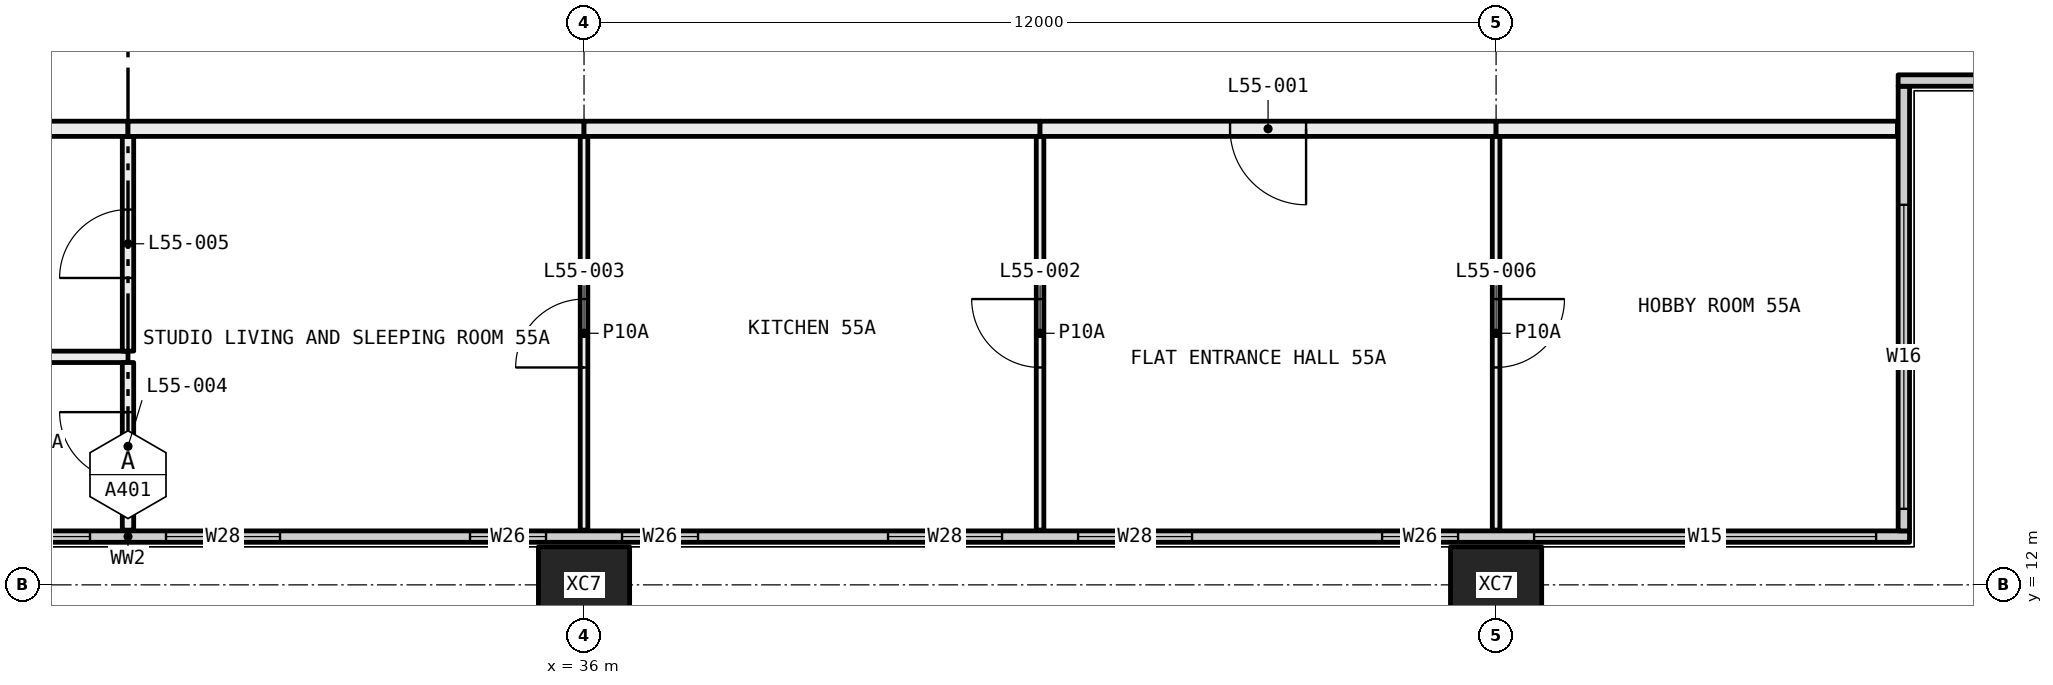
"""IFC4 building model, lengths in metres.
Left out: names, types, materials, properties, quantities, classifications, styles, units other than length and angle.
Written with IfcOpenShell. Run it as: python <this file> out.ifc"""

import sys

from ifc_helpers import new_model, si_unit, direction, frame, frame_2d, origin, origin_2d, place, context, subcontext, project, spatial, rectangle, hollow_rectangle, extrude, element, fill, save


model = new_model("IFC4")
c1 = context("Model", 3, precision=1e-05, world=origin(), true_north=direction((0.0, 1.0)))
c2 = subcontext(c1, "Body", "Model", "MODEL_VIEW")
j1 = project(units=[si_unit("LENGTHUNIT", "METRE"), si_unit("PLANEANGLEUNIT", "RADIAN")], contexts=[c1])
p1 = place(None, origin())
s1 = spatial("IfcSite", under=j1, at=p1, CompositionType="ELEMENT")
p2 = place(p1, origin())
s2 = spatial("IfcBuilding", under=s1, at=p2, CompositionType="ELEMENT")
p3 = place(p2, frame((0.0, 0.0, 206.55)))
s3 = spatial("IfcBuildingStorey", under=s2, at=p3, CompositionType="ELEMENT", Elevation=206.55)
for number, where, z_axis, x_axis in (
    (1, (36.0, 12.0, -0.4), (0.0, 0.0, 1.0), (1.0, 0.0, 0.0)),
    (2, (48.0, 12.0, -0.4), (0.0, 0.0, 1.0), (1.0, 0.0, 0.0)),
):
    element("IfcColumn", number, at=place(p3, frame(where, z_axis=z_axis, x_axis=x_axis)), inside=s3, PredefinedType="COLUMN", context=c2, shape_type="SweptSolid", body=[
        extrude(hollow_rectangle(XDim=1.2, YDim=1.0, WallThickness=0.045, at=origin_2d()), origin(), (0.0, 0.0, 1.0), 3.45),
    ])
p4 = place(p3, frame((6.56, 12.635, 0.0), z_axis=(0.0, 0.0, 1.0), x_axis=(1.0, 0.0, 0.0)))
e3 = element("IfcWall", 3, at=p4, inside=s3, PredefinedType="ELEMENTEDWALL", context=c2, shape_type="SweptSolid", body=[
    extrude(rectangle(XDim=46.88, YDim=0.15, at=frame_2d((23.44, 0.0))), origin(), (0.0, 0.0, 1.0), 3.05),
])
p5 = place(p4, frame((0.44, 0.0, 0.45)))
e4 = element("IfcOpeningElement", 4, at=p5, cuts=e3, PredefinedType="OPENING", context=c2, shape_type="SweptSolid", body=[
    extrude(rectangle(XDim=4.5, YDim=2.55, at=frame_2d((2.25, 1.275))), frame((0.0, 0.085, 0.0), z_axis=(0.0, -1.0, 0.0), x_axis=(1.0, 0.0, 0.0)), (0.0, 0.0, 1.0), 0.17),
])
p6 = place(p4, frame((5.94, 0.0, 0.45)))
e5 = element("IfcOpeningElement", 5, at=p6, cuts=e3, PredefinedType="OPENING", context=c2, shape_type="SweptSolid", body=[
    extrude(rectangle(XDim=1.0, YDim=2.55, at=frame_2d((0.5, 1.275))), frame((0.0, 0.085, 0.0), z_axis=(0.0, -1.0, 0.0), x_axis=(1.0, 0.0, 0.0)), (0.0, 0.0, 1.0), 0.17),
])
p7 = place(p4, frame((9.44, 0.0, 0.45)))
e6 = element("IfcOpeningElement", 6, at=p7, cuts=e3, PredefinedType="OPENING", context=c2, shape_type="SweptSolid", body=[
    extrude(rectangle(XDim=1.5, YDim=2.55, at=frame_2d((0.75, 1.275))), frame((0.0, 0.085, 0.0), z_axis=(0.0, -1.0, 0.0), x_axis=(1.0, 0.0, 0.0)), (0.0, 0.0, 1.0), 0.17),
])
p8 = place(p4, frame((11.94, 0.0, 0.45)))
e7 = element("IfcOpeningElement", 7, at=p8, cuts=e3, PredefinedType="OPENING", context=c2, shape_type="SweptSolid", body=[
    extrude(rectangle(XDim=1.5, YDim=2.55, at=frame_2d((0.75, 1.275))), frame((0.0, 0.085, 0.0), z_axis=(0.0, -1.0, 0.0), x_axis=(1.0, 0.0, 0.0)), (0.0, 0.0, 1.0), 0.17),
])
p9 = place(p4, frame((15.94, 0.0, 0.45)))
e8 = element("IfcOpeningElement", 8, at=p9, cuts=e3, PredefinedType="OPENING", context=c2, shape_type="SweptSolid", body=[
    extrude(rectangle(XDim=1.0, YDim=2.55, at=frame_2d((0.5, 1.275))), frame((0.0, 0.085, 0.0), z_axis=(0.0, -1.0, 0.0), x_axis=(1.0, 0.0, 0.0)), (0.0, 0.0, 1.0), 0.17),
])
p10 = place(p4, frame((17.94, 0.0, 0.45)))
e9 = element("IfcOpeningElement", 9, at=p10, cuts=e3, PredefinedType="OPENING", context=c2, shape_type="SweptSolid", body=[
    extrude(rectangle(XDim=1.0, YDim=2.55, at=frame_2d((0.5, 1.275))), frame((0.0, 0.085, 0.0), z_axis=(0.0, -1.0, 0.0), x_axis=(1.0, 0.0, 0.0)), (0.0, 0.0, 1.0), 0.17),
])
p11 = place(p4, frame((21.44, 0.0, 0.45)))
e10 = element("IfcOpeningElement", 10, at=p11, cuts=e3, PredefinedType="OPENING", context=c2, shape_type="SweptSolid", body=[
    extrude(rectangle(XDim=1.5, YDim=2.55, at=frame_2d((0.75, 1.275))), frame((0.0, 0.085, 0.0), z_axis=(0.0, -1.0, 0.0), x_axis=(1.0, 0.0, 0.0)), (0.0, 0.0, 1.0), 0.17),
])
p12 = place(p4, frame((23.94, 0.0, 0.45)))
e11 = element("IfcOpeningElement", 11, at=p12, cuts=e3, PredefinedType="OPENING", context=c2, shape_type="SweptSolid", body=[
    extrude(rectangle(XDim=1.5, YDim=2.55, at=frame_2d((0.75, 1.275))), frame((0.0, 0.085, 0.0), z_axis=(0.0, -1.0, 0.0), x_axis=(1.0, 0.0, 0.0)), (0.0, 0.0, 1.0), 0.17),
])
p13 = place(p4, frame((27.94, 0.0, 0.45)))
e12 = element("IfcOpeningElement", 12, at=p13, cuts=e3, PredefinedType="OPENING", context=c2, shape_type="SweptSolid", body=[
    extrude(rectangle(XDim=1.0, YDim=2.55, at=frame_2d((0.5, 1.275))), frame((0.0, 0.085, 0.0), z_axis=(0.0, -1.0, 0.0), x_axis=(1.0, 0.0, 0.0)), (0.0, 0.0, 1.0), 0.17),
])
p14 = place(p4, frame((29.94, 0.0, 0.45)))
e13 = element("IfcOpeningElement", 13, at=p14, cuts=e3, PredefinedType="OPENING", context=c2, shape_type="SweptSolid", body=[
    extrude(rectangle(XDim=1.0, YDim=2.55, at=frame_2d((0.5, 1.275))), frame((0.0, 0.085, 0.0), z_axis=(0.0, -1.0, 0.0), x_axis=(1.0, 0.0, 0.0)), (0.0, 0.0, 1.0), 0.17),
])
p15 = place(p4, frame((33.44, 0.0, 0.45)))
e14 = element("IfcOpeningElement", 14, at=p15, cuts=e3, PredefinedType="OPENING", context=c2, shape_type="SweptSolid", body=[
    extrude(rectangle(XDim=1.5, YDim=2.55, at=frame_2d((0.75, 1.275))), frame((0.0, 0.085, 0.0), z_axis=(0.0, -1.0, 0.0), x_axis=(1.0, 0.0, 0.0)), (0.0, 0.0, 1.0), 0.17),
])
p16 = place(p4, frame((35.94, 0.0, 0.45)))
e15 = element("IfcOpeningElement", 15, at=p16, cuts=e3, PredefinedType="OPENING", context=c2, shape_type="SweptSolid", body=[
    extrude(rectangle(XDim=1.5, YDim=2.55, at=frame_2d((0.75, 1.275))), frame((0.0, 0.085, 0.0), z_axis=(0.0, -1.0, 0.0), x_axis=(1.0, 0.0, 0.0)), (0.0, 0.0, 1.0), 0.17),
])
p17 = place(p4, frame((39.94, 0.0, 0.45)))
e16 = element("IfcOpeningElement", 16, at=p17, cuts=e3, PredefinedType="OPENING", context=c2, shape_type="SweptSolid", body=[
    extrude(rectangle(XDim=1.0, YDim=2.55, at=frame_2d((0.5, 1.275))), frame((0.0, 0.085, 0.0), z_axis=(0.0, -1.0, 0.0), x_axis=(1.0, 0.0, 0.0)), (0.0, 0.0, 1.0), 0.17),
])
p18 = place(p4, frame((41.94, 0.0, 0.45)))
e17 = element("IfcOpeningElement", 17, at=p18, cuts=e3, PredefinedType="OPENING", context=c2, shape_type="SweptSolid", body=[
    extrude(rectangle(XDim=4.5, YDim=2.55, at=frame_2d((2.25, 1.275))), frame((0.0, 0.085, 0.0), z_axis=(0.0, -1.0, 0.0), x_axis=(1.0, 0.0, 0.0)), (0.0, 0.0, 1.0), 0.17),
])
p19 = place(p3, frame((53.365, 12.71, 0.0), z_axis=(0.0, 0.0, 1.0), x_axis=(0.0, 1.0, 0.0)))
e18 = element("IfcWall", 18, at=p19, inside=s3, PredefinedType="ELEMENTEDWALL", context=c2, shape_type="SweptSolid", body=[
    extrude(rectangle(XDim=5.85, YDim=0.15, at=frame_2d((2.925, 0.0))), origin(), (0.0, 0.0, 1.0), 3.05),
])
p20 = place(p19, frame((0.29, 0.0, 0.45)))
e19 = element("IfcOpeningElement", 19, at=p20, cuts=e18, PredefinedType="OPENING", context=c2, shape_type="SweptSolid", body=[
    extrude(rectangle(XDim=4.0, YDim=2.55, at=frame_2d((2.0, 1.275))), frame((0.0, 0.085, 0.0), z_axis=(0.0, -1.0, 0.0), x_axis=(1.0, 0.0, 0.0)), (0.0, 0.0, 1.0), 0.17),
])
p21 = place(p3, frame((53.29, 18.635, 0.0), z_axis=(0.0, 0.0, 1.0), x_axis=(1.0, 0.0, 0.0)))
e20 = element("IfcWall", 20, at=p21, inside=s3, PredefinedType="ELEMENTEDWALL", context=c2, shape_type="SweptSolid", body=[
    extrude(rectangle(XDim=6.15, YDim=0.15, at=frame_2d((3.075, 0.0))), origin(), (0.0, 0.0, 1.0), 3.05),
])
p22 = place(p21, frame((1.71, 0.0, 0.45)))
e21 = element("IfcOpeningElement", 21, at=p22, cuts=e20, PredefinedType="OPENING", context=c2, shape_type="SweptSolid", body=[
    extrude(rectangle(XDim=4.0, YDim=2.55, at=frame_2d((2.0, 1.275))), frame((0.0, 0.085, 0.0), z_axis=(0.0, -1.0, 0.0), x_axis=(1.0, 0.0, 0.0)), (0.0, 0.0, 1.0), 0.17),
])
p23 = place(p3, frame((30.0, 15.0, 0.0), z_axis=(0.0, 0.0, 1.0), x_axis=(-1.0, 0.0, 0.0)))
e22 = element("IfcWall", 22, at=p23, inside=s3, PredefinedType="PARTITIONING", context=c2, shape_type="SweptSolid", body=[
    extrude(rectangle(XDim=5.9, YDim=0.15, at=frame_2d((2.95, 0.0))), origin(), (0.0, 0.0, 1.0), 3.05),
])
p24 = place(p3, frame((30.0, 12.72, 0.0), z_axis=(0.0, 0.0, 1.0), x_axis=(0.0, 1.0, 0.0)))
e23 = element("IfcWall", 23, at=p24, inside=s3, PredefinedType="PARTITIONING", context=c2, shape_type="SweptSolid", body=[
    extrude(rectangle(XDim=2.205, YDim=0.15, at=frame_2d((1.103, 0.0))), origin(), (0.0, 0.0, 1.0), 3.05),
])
p25 = place(p24, frame((0.653, 0.0, 0.0)))
e24 = element("IfcOpeningElement", 24, at=p25, cuts=e23, PredefinedType="OPENING", context=c2, shape_type="SweptSolid", body=[
    extrude(rectangle(XDim=0.9, YDim=2.1, at=frame_2d((0.45, 1.05))), frame((0.0, 0.085, 0.0), z_axis=(0.0, -1.0, 0.0), x_axis=(1.0, 0.0, 0.0)), (0.0, 0.0, 1.0), 0.17),
])
p26 = place(p3, frame((30.0, 15.075, 0.0), z_axis=(0.0, 0.0, 1.0), x_axis=(0.0, 1.0, 0.0)))
e25 = element("IfcWall", 25, at=p26, inside=s3, PredefinedType="PARTITIONING", context=c2, shape_type="SweptSolid", body=[
    extrude(rectangle(XDim=2.825, YDim=0.15, at=frame_2d((1.413, 0.0))), origin(), (0.0, 0.0, 1.0), 3.05),
])
p27 = place(p26, frame((0.962, 0.0, 0.0)))
e26 = element("IfcOpeningElement", 26, at=p27, cuts=e25, PredefinedType="OPENING", context=c2, shape_type="SweptSolid", body=[
    extrude(rectangle(XDim=0.9, YDim=2.1, at=frame_2d((0.45, 1.05))), frame((0.0, 0.085, 0.0), z_axis=(0.0, -1.0, 0.0), x_axis=(1.0, 0.0, 0.0)), (0.0, 0.0, 1.0), 0.17),
])
p28 = place(p3, frame((30.0, 18.0, 0.0), z_axis=(0.0, 0.0, 1.0), x_axis=(-1.0, 0.0, 0.0)))
e27 = element("IfcWall", 27, at=p28, inside=s3, PredefinedType="PARTITIONING", context=c2, shape_type="SweptSolid", body=[
    extrude(rectangle(XDim=5.9, YDim=0.2, at=frame_2d((2.95, 0.0))), origin(), (0.0, 0.0, 1.0), 3.05),
])
p29 = place(p3, frame((36.0, 12.72, 0.0), z_axis=(0.0, 0.0, 1.0), x_axis=(0.0, 1.0, 0.0)))
e28 = element("IfcWall", 28, at=p29, inside=s3, PredefinedType="PARTITIONING", context=c2, shape_type="SweptSolid", body=[
    extrude(rectangle(XDim=5.18, YDim=0.1, at=frame_2d((2.59, 0.0))), origin(), (0.0, 0.0, 1.0), 2.45),
])
p30 = place(p29, frame((2.14, 0.0, 0.0)))
e29 = element("IfcOpeningElement", 29, at=p30, cuts=e28, PredefinedType="OPENING", context=c2, shape_type="SweptSolid", body=[
    extrude(rectangle(XDim=0.9, YDim=2.1, at=frame_2d((0.45, 1.05))), frame((0.0, 0.06, 0.0), z_axis=(0.0, -1.0, 0.0), x_axis=(1.0, 0.0, 0.0)), (0.0, 0.0, 1.0), 0.12),
])
p31 = place(p3, frame((36.0, 18.0, 0.0), z_axis=(0.0, 0.0, 1.0), x_axis=(-1.0, 0.0, 0.0)))
e30 = element("IfcWall", 30, at=p31, inside=s3, PredefinedType="PARTITIONING", context=c2, shape_type="SweptSolid", body=[
    extrude(rectangle(XDim=6.0, YDim=0.2, at=frame_2d((3.0, 0.0))), origin(), (0.0, 0.0, 1.0), 2.45),
])
p32 = place(p3, frame((42.0, 12.72, 0.0), z_axis=(0.0, 0.0, 1.0), x_axis=(0.0, 1.0, 0.0)))
e31 = element("IfcWall", 31, at=p32, inside=s3, PredefinedType="PARTITIONING", context=c2, shape_type="SweptSolid", body=[
    extrude(rectangle(XDim=5.18, YDim=0.1, at=frame_2d((2.59, 0.0))), origin(), (0.0, 0.0, 1.0), 3.05),
])
p33 = place(p32, frame((2.14, 0.0, 0.0)))
e32 = element("IfcOpeningElement", 32, at=p33, cuts=e31, PredefinedType="OPENING", context=c2, shape_type="SweptSolid", body=[
    extrude(rectangle(XDim=0.9, YDim=2.1, at=frame_2d((0.45, 1.05))), frame((0.0, 0.06, 0.0), z_axis=(0.0, -1.0, 0.0), x_axis=(1.0, 0.0, 0.0)), (0.0, 0.0, 1.0), 0.12),
])
p34 = place(p3, frame((42.0, 18.0, 0.0), z_axis=(0.0, 0.0, 1.0), x_axis=(-1.0, 0.0, 0.0)))
e33 = element("IfcWall", 33, at=p34, inside=s3, PredefinedType="PARTITIONING", context=c2, shape_type="SweptSolid", body=[
    extrude(rectangle(XDim=6.0, YDim=0.2, at=frame_2d((3.0, 0.0))), origin(), (0.0, 0.0, 1.0), 2.45),
])
p35 = place(p3, frame((48.0, 12.72, 0.0), z_axis=(0.0, 0.0, 1.0), x_axis=(0.0, 1.0, 0.0)))
e34 = element("IfcWall", 34, at=p35, inside=s3, PredefinedType="PARTITIONING", context=c2, shape_type="SweptSolid", body=[
    extrude(rectangle(XDim=5.18, YDim=0.1, at=frame_2d((2.59, 0.0))), origin(), (0.0, 0.0, 1.0), 3.05),
])
p36 = place(p35, frame((2.14, 0.0, 0.0)))
e35 = element("IfcOpeningElement", 35, at=p36, cuts=e34, PredefinedType="OPENING", context=c2, shape_type="SweptSolid", body=[
    extrude(rectangle(XDim=0.9, YDim=2.1, at=frame_2d((0.45, 1.05))), frame((0.0, 0.06, 0.0), z_axis=(0.0, -1.0, 0.0), x_axis=(1.0, 0.0, 0.0)), (0.0, 0.0, 1.0), 0.12),
])
p37 = place(p3, frame((48.0, 18.0, 0.0), z_axis=(0.0, 0.0, 1.0), x_axis=(-1.0, 0.0, 0.0)))
e36 = element("IfcWall", 36, at=p37, inside=s3, PredefinedType="PARTITIONING", context=c2, shape_type="SweptSolid", body=[
    extrude(rectangle(XDim=6.0, YDim=0.2, at=frame_2d((3.0, 0.0))), origin(), (0.0, 0.0, 1.0), 3.05),
])
p38 = place(p37, frame((2.5, 0.0, 0.0)))
e37 = element("IfcOpeningElement", 37, at=p38, cuts=e36, PredefinedType="OPENING", context=c2, shape_type="SweptSolid", body=[
    extrude(rectangle(XDim=1.0, YDim=2.1, at=frame_2d((0.5, 1.05))), frame((0.0, 0.11, 0.0), z_axis=(0.0, -1.0, 0.0), x_axis=(1.0, 0.0, 0.0)), (0.0, 0.0, 1.0), 0.22),
])
p39 = place(p3, frame((53.28, 18.0, 0.0), z_axis=(0.0, 0.0, 1.0), x_axis=(-1.0, 0.0, 0.0)))
e38 = element("IfcWall", 38, at=p39, inside=s3, PredefinedType="PARTITIONING", context=c2, shape_type="SweptSolid", body=[
    extrude(rectangle(XDim=5.28, YDim=0.2, at=frame_2d((2.64, 0.0))), origin(), (0.0, 0.0, 1.0), 3.05),
])
p40 = place(p11, origin())
e39 = element("IfcWindow", 39, at=p40, inside=s3, PartitioningType="SINGLE_PANEL", PredefinedType="WINDOW", context=c2, shape_type="SweptSolid", body=[
    extrude(rectangle(XDim=1.5, YDim=2.55, at=frame_2d((0.75, 1.275))), frame((0.0, 0.03, 0.0), z_axis=(0.0, -1.0, 0.0), x_axis=(1.0, 0.0, 0.0)), (0.0, 0.0, 1.0), 0.06),
])
fill(e10, e39)
p41 = place(p12, origin())
e40 = element("IfcWindow", 40, at=p41, inside=s3, PartitioningType="SINGLE_PANEL", PredefinedType="WINDOW", context=c2, shape_type="SweptSolid", body=[
    extrude(rectangle(XDim=1.5, YDim=2.55, at=frame_2d((0.75, 1.275))), frame((0.0, 0.03, 0.0), z_axis=(0.0, -1.0, 0.0), x_axis=(1.0, 0.0, 0.0)), (0.0, 0.0, 1.0), 0.06),
])
fill(e11, e40)
p42 = place(p13, origin())
e41 = element("IfcWindow", 41, at=p42, inside=s3, PartitioningType="SINGLE_PANEL", PredefinedType="WINDOW", context=c2, shape_type="SweptSolid", body=[
    extrude(rectangle(XDim=1.0, YDim=2.55, at=frame_2d((0.5, 1.275))), frame((0.0, 0.03, 0.0), z_axis=(0.0, -1.0, 0.0), x_axis=(1.0, 0.0, 0.0)), (0.0, 0.0, 1.0), 0.06),
])
fill(e12, e41)
p43 = place(p14, origin())
e42 = element("IfcWindow", 42, at=p43, inside=s3, PartitioningType="SINGLE_PANEL", PredefinedType="WINDOW", context=c2, shape_type="SweptSolid", body=[
    extrude(rectangle(XDim=1.0, YDim=2.55, at=frame_2d((0.5, 1.275))), frame((0.0, 0.03, 0.0), z_axis=(0.0, -1.0, 0.0), x_axis=(1.0, 0.0, 0.0)), (0.0, 0.0, 1.0), 0.06),
])
fill(e13, e42)
p44 = place(p15, origin())
e43 = element("IfcWindow", 43, at=p44, inside=s3, PartitioningType="SINGLE_PANEL", PredefinedType="WINDOW", context=c2, shape_type="SweptSolid", body=[
    extrude(rectangle(XDim=1.5, YDim=2.55, at=frame_2d((0.75, 1.275))), frame((0.0, 0.03, 0.0), z_axis=(0.0, -1.0, 0.0), x_axis=(1.0, 0.0, 0.0)), (0.0, 0.0, 1.0), 0.06),
])
fill(e14, e43)
p45 = place(p16, origin())
e44 = element("IfcWindow", 44, at=p45, inside=s3, PartitioningType="SINGLE_PANEL", PredefinedType="WINDOW", context=c2, shape_type="SweptSolid", body=[
    extrude(rectangle(XDim=1.5, YDim=2.55, at=frame_2d((0.75, 1.275))), frame((0.0, 0.03, 0.0), z_axis=(0.0, -1.0, 0.0), x_axis=(1.0, 0.0, 0.0)), (0.0, 0.0, 1.0), 0.06),
])
fill(e15, e44)
p46 = place(p17, origin())
e45 = element("IfcWindow", 45, at=p46, inside=s3, PartitioningType="SINGLE_PANEL", PredefinedType="WINDOW", context=c2, shape_type="SweptSolid", body=[
    extrude(rectangle(XDim=1.0, YDim=2.55, at=frame_2d((0.5, 1.275))), frame((0.0, 0.03, 0.0), z_axis=(0.0, -1.0, 0.0), x_axis=(1.0, 0.0, 0.0)), (0.0, 0.0, 1.0), 0.06),
])
fill(e16, e45)
p47 = place(p18, origin())
e46 = element("IfcWindow", 46, at=p47, inside=s3, PartitioningType="SINGLE_PANEL", PredefinedType="WINDOW", context=c2, shape_type="SweptSolid", body=[
    extrude(rectangle(XDim=4.5, YDim=2.55, at=frame_2d((2.25, 1.275))), frame((0.0, 0.03, 0.0), z_axis=(0.0, -1.0, 0.0), x_axis=(1.0, 0.0, 0.0)), (0.0, 0.0, 1.0), 0.06),
])
fill(e17, e46)
p48 = place(p20, origin())
e47 = element("IfcWindow", 47, at=p48, inside=s3, PartitioningType="SINGLE_PANEL", PredefinedType="WINDOW", context=c2, shape_type="SweptSolid", body=[
    extrude(rectangle(XDim=4.0, YDim=2.55, at=frame_2d((2.0, 1.275))), frame((0.0, 0.03, 0.0), z_axis=(0.0, -1.0, 0.0), x_axis=(1.0, 0.0, 0.0)), (0.0, 0.0, 1.0), 0.06),
])
fill(e19, e47)
p49 = place(p38, origin())
e48 = element("IfcDoor", 48, at=p49, inside=s3, OperationType="SINGLE_SWING_RIGHT", PredefinedType="DOOR", context=c2, shape_type="SweptSolid", body=[
    extrude(rectangle(XDim=1.0, YDim=2.1, at=frame_2d((0.5, 1.05))), frame((0.0, 0.025, 0.0), z_axis=(0.0, -1.0, 0.0), x_axis=(1.0, 0.0, 0.0)), (0.0, 0.0, 1.0), 0.05),
])
fill(e37, e48)
p50 = place(p33, origin())
e49 = element("IfcDoor", 49, at=p50, inside=s3, OperationType="SINGLE_SWING_LEFT", PredefinedType="DOOR", context=c2, shape_type="SweptSolid", body=[
    extrude(rectangle(XDim=0.9, YDim=2.1, at=frame_2d((0.45, 1.05))), frame((0.0, 0.025, 0.0), z_axis=(0.0, -1.0, 0.0), x_axis=(1.0, 0.0, 0.0)), (0.0, 0.0, 1.0), 0.05),
])
fill(e32, e49)
p51 = place(p30, origin())
e50 = element("IfcDoor", 50, at=p51, inside=s3, OperationType="SINGLE_SWING_RIGHT", PredefinedType="DOOR", context=c2, shape_type="SweptSolid", body=[
    extrude(rectangle(XDim=0.9, YDim=2.1, at=frame_2d((0.45, 1.05))), frame((0.0, 0.025, 0.0), z_axis=(0.0, -1.0, 0.0), x_axis=(1.0, 0.0, 0.0)), (0.0, 0.0, 1.0), 0.05),
])
fill(e29, e50)
p52 = place(p25, origin())
e51 = element("IfcDoor", 51, at=p52, inside=s3, OperationType="SINGLE_SWING_LEFT", PredefinedType="DOOR", context=c2, shape_type="SweptSolid", body=[
    extrude(rectangle(XDim=0.9, YDim=2.1, at=frame_2d((0.45, 1.05))), frame((0.0, 0.025, 0.0), z_axis=(0.0, -1.0, 0.0), x_axis=(1.0, 0.0, 0.0)), (0.0, 0.0, 1.0), 0.05),
])
fill(e24, e51)
p53 = place(p27, origin())
e52 = element("IfcDoor", 52, at=p53, inside=s3, OperationType="SINGLE_SWING_RIGHT", PredefinedType="DOOR", context=c2, shape_type="SweptSolid", body=[
    extrude(rectangle(XDim=0.9, YDim=2.1, at=frame_2d((0.45, 1.05))), frame((0.0, 0.025, 0.0), z_axis=(0.0, -1.0, 0.0), x_axis=(1.0, 0.0, 0.0)), (0.0, 0.0, 1.0), 0.05),
])
fill(e26, e52)
p54 = place(p36, frame((0.9, 0.0, 0.0), x_axis=(-1.0, 0.0, 0.0)))
e53 = element("IfcDoor", 53, at=p54, inside=s3, OperationType="SINGLE_SWING_RIGHT", PredefinedType="DOOR", context=c2, shape_type="SweptSolid", body=[
    extrude(rectangle(XDim=0.9, YDim=2.1, at=frame_2d((0.45, 1.05))), frame((0.0, 0.025, 0.0), z_axis=(0.0, -1.0, 0.0), x_axis=(1.0, 0.0, 0.0)), (0.0, 0.0, 1.0), 0.05),
])
fill(e35, e53)
save(model, sys.argv[1])
